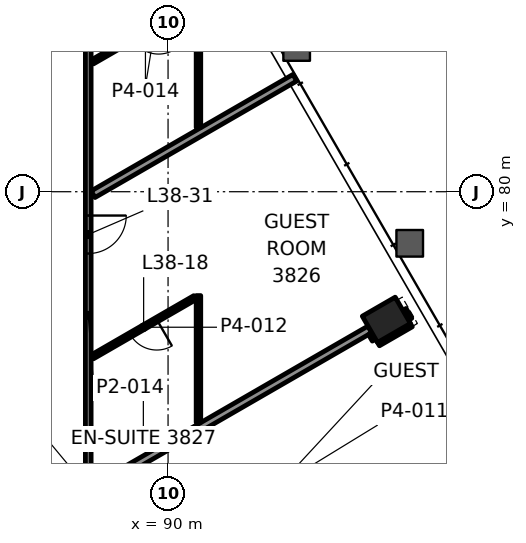
"""IFC4 building model, lengths in metres.
Left out: names, types, materials, properties, quantities, classifications, styles, units other than length and angle.
Written with IfcOpenShell. Run it as: python <this file> out.ifc"""

import sys

from ifc_helpers import new_model, si_unit, direction, frame, frame_2d, origin, origin_2d, place, context, subcontext, project, spatial, rectangle, hollow_rectangle, extrude, element, fill, save


model = new_model("IFC4")
c1 = context("Model", 3, precision=1e-05, world=origin(), true_north=direction((0.0, 1.0)))
c2 = subcontext(c1, "Body", "Model", "MODEL_VIEW")
j1 = project(units=[si_unit("LENGTHUNIT", "METRE"), si_unit("PLANEANGLEUNIT", "RADIAN")], contexts=[c1])
p1 = place(None, origin())
s1 = spatial("IfcSite", under=j1, at=p1, CompositionType="ELEMENT")
p2 = place(p1, origin())
s2 = spatial("IfcBuilding", under=s1, at=p2, CompositionType="ELEMENT")
p3 = place(p2, frame((0.0, 0.0, 167.5)))
s3 = spatial("IfcBuildingStorey", under=s2, at=p3, CompositionType="ELEMENT", Elevation=167.5)
p4 = place(p3, frame((95.744, 76.628, -0.0), z_axis=(0.0, 0.0, 1.0), x_axis=(-0.5, 0.866025403784, 0.0)))
e1 = element("IfcColumn", 1, at=p4, inside=s3, PredefinedType="COLUMN", context=c2, shape_type="SweptSolid", body=[
    extrude(hollow_rectangle(XDim=0.8, YDim=1.0, WallThickness=0.05, at=origin_2d()), origin(), (0.0, 0.0, 1.0), 3.9),
])
p5 = place(p3, frame((89.47, 67.832, 0.0), z_axis=(0.0, 0.0, 1.0), x_axis=(0.866016372647, 0.500015642063, 0.0)))
e2 = element("IfcWall", 2, at=p5, inside=s3, PredefinedType="PARTITIONING", context=c2, shape_type="SweptSolid", body=[
    extrude(rectangle(XDim=10.932, YDim=0.2, at=frame_2d((5.466, 0.0))), origin(), (0.0, 0.0, 1.0), 3.022),
])
p6 = place(p3, frame((95.512, 76.032, 0.0), z_axis=(0.0, 0.0, 1.0), x_axis=(0.86597798544, 0.50008212199, 0.0)))
e3 = element("IfcWall", 3, at=p6, inside=s3, PredefinedType="PARTITIONING", context=c2, shape_type="SweptSolid", body=[
    extrude(rectangle(XDim=0.999, YDim=0.2, at=frame_2d((0.5, 0.0))), origin(), (0.0, 0.0, 1.0), 3.022),
])
p7 = place(p3, frame((88.027, 72.173, 0.0), z_axis=(0.0, 0.0, 1.0), x_axis=(0.866035743139, 0.499982091285, 0.0)))
e4 = element("IfcWall", 4, at=p7, inside=s3, PredefinedType="PARTITIONING", context=c2, shape_type="SweptSolid", body=[
    extrude(rectangle(XDim=8.411, YDim=0.2, at=frame_2d((4.206, 0.0))), origin(), (0.0, 0.0, 1.0), 3.1),
])
p8 = place(p3, frame((90.705, 77.212, 0.0), z_axis=(0.0, 0.0, 1.0), x_axis=(-0.866009247561, -0.500027982357, 0.0)))
e5 = element("IfcWall", 5, at=p8, inside=s3, PredefinedType="PARTITIONING", context=c2, shape_type="SweptSolid", body=[
    extrude(rectangle(XDim=3.113, YDim=0.12, at=frame_2d((1.556, 0.0))), origin(), (0.0, 0.0, 1.0), 3.1),
])
p9 = place(p8, frame((1.156, 0.0, 0.0)))
e6 = element("IfcOpeningElement", 6, at=p9, cuts=e5, PredefinedType="OPENING", context=c2, shape_type="SweptSolid", body=[
    extrude(rectangle(XDim=0.8, YDim=2.1, at=frame_2d((0.4, 1.05))), frame((0.0, 0.07, 0.0), z_axis=(0.0, -1.0, 0.0), x_axis=(1.0, 0.0, 0.0)), (0.0, 0.0, 1.0), 0.14),
])
p10 = place(p3, frame((88.027, 79.934, 0.0), z_axis=(0.0, 0.0, 1.0), x_axis=(0.866029087811, 0.499993619025, 0.0)))
e7 = element("IfcWall", 7, at=p10, inside=s3, PredefinedType="PARTITIONING", context=c2, shape_type="SweptSolid", body=[
    extrude(rectangle(XDim=6.131, YDim=0.2, at=frame_2d((3.065, 0.0))), origin(), (0.0, 0.0, 1.0), 3.022),
])
p11 = place(p3, frame((90.8, 85.028, 0.0), z_axis=(0.0, 0.0, 1.0), x_axis=(-0.866010186656, -0.500026355914, 0.0)))
e8 = element("IfcWall", 8, at=p11, inside=s3, PredefinedType="PARTITIONING", context=c2, shape_type="SweptSolid", body=[
    extrude(rectangle(XDim=3.222, YDim=0.12, at=frame_2d((1.611, 0.0))), origin(), (0.0, 0.0, 1.0), 3.022),
])
p12 = place(p11, frame((1.211, 0.0, 0.0)))
e9 = element("IfcOpeningElement", 9, at=p12, cuts=e8, PredefinedType="OPENING", context=c2, shape_type="SweptSolid", body=[
    extrude(rectangle(XDim=0.8, YDim=2.1, at=frame_2d((0.4, 1.05))), frame((0.0, 0.07, 0.0), z_axis=(0.0, -1.0, 0.0), x_axis=(1.0, 0.0, 0.0)), (0.0, 0.0, 1.0), 0.14),
])
p13 = place(p3, frame((90.8, 73.929, 0.0), z_axis=(0.0, 0.0, 1.0), x_axis=(0.0, 1.0, 0.0)))
e10 = element("IfcWall", 10, at=p13, inside=s3, PredefinedType="PARTITIONING", context=c2, shape_type="SweptSolid", body=[
    extrude(rectangle(XDim=3.337, YDim=0.12, at=frame_2d((1.668, 0.0))), origin(), (0.0, 0.0, 1.0), 3.1),
])
p14 = place(p3, frame((90.8, 81.69, 0.0), z_axis=(0.0, 0.0, 1.0), x_axis=(0.0, 1.0, 0.0)))
e11 = element("IfcWall", 11, at=p14, inside=s3, PredefinedType="PARTITIONING", context=c2, shape_type="SweptSolid", body=[
    extrude(rectangle(XDim=2.502, YDim=0.12, at=frame_2d((1.251, 0.0))), origin(), (0.0, 0.0, 1.0), 3.1),
])
p15 = place(p3, frame((87.9, 84.899, 0.0), z_axis=(0.0, 0.0, 1.0), x_axis=(0.0, -1.0, 0.0)))
e12 = element("IfcWall", 12, at=p15, inside=s3, PredefinedType="PARTITIONING", context=c2, shape_type="SweptSolid", body=[
    extrude(rectangle(XDim=16.308, YDim=0.15, at=frame_2d((8.154, 0.0))), origin(), (0.0, 0.0, 1.0), 3.1),
])
p16 = place(p15, frame((5.527, 0.0, 0.0)))
e13 = element("IfcOpeningElement", 13, at=p16, cuts=e12, PredefinedType="OPENING", context=c2, shape_type="SweptSolid", body=[
    extrude(rectangle(XDim=1.0, YDim=2.1, at=frame_2d((0.5, 1.05))), frame((0.0, 0.085, 0.0), z_axis=(0.0, -1.0, 0.0), x_axis=(1.0, 0.0, 0.0)), (0.0, 0.0, 1.0), 0.17),
])
p17 = place(p15, frame((13.074, 0.0, 0.0)))
e14 = element("IfcOpeningElement", 14, at=p17, cuts=e12, PredefinedType="OPENING", context=c2, shape_type="SweptSolid", body=[
    extrude(rectangle(XDim=1.0, YDim=2.1, at=frame_2d((0.5, 1.05))), frame((0.0, 0.085, 0.0), z_axis=(0.0, -1.0, 0.0), x_axis=(1.0, 0.0, 0.0)), (0.0, 0.0, 1.0), 0.17),
])
p18 = place(p3, frame((96.327, 76.619, 0.0), z_axis=(0.0, 0.0, 1.0), x_axis=(-0.49965177357, 0.866226359082, 0.0)))
e15 = element("IfcWall", 15, at=p18, inside=s3, PredefinedType="PARTITIONING", context=c2, shape_type="SweptSolid", body=[
    extrude(rectangle(XDim=0.299, YDim=0.2, at=frame_2d((0.149, 0.0))), origin(), (0.0, 0.0, 1.0), 3.1),
])
p19 = place(p3, frame((95.461, 76.119, 0.0), z_axis=(0.0, 0.0, 1.0), x_axis=(-0.500359323436, 0.865817848887, 0.0)))
e16 = element("IfcWall", 16, at=p19, inside=s3, PredefinedType="PARTITIONING", context=c2, shape_type="SweptSolid", body=[
    extrude(rectangle(XDim=0.199, YDim=0.2, at=frame_2d((0.1, 0.0))), origin(), (0.0, 0.0, 1.0), 3.1),
])
p20 = place(p9, origin())
e17 = element("IfcDoor", 17, at=p20, inside=s3, OperationType="SINGLE_SWING_LEFT", PredefinedType="DOOR", context=c2, shape_type="SweptSolid", body=[
    extrude(rectangle(XDim=0.8, YDim=2.1, at=frame_2d((0.4, 1.05))), frame((0.0, 0.025, 0.0), z_axis=(0.0, -1.0, 0.0), x_axis=(1.0, 0.0, 0.0)), (0.0, 0.0, 1.0), 0.05),
])
fill(e6, e17)
p21 = place(p16, origin())
e18 = element("IfcDoor", 18, at=p21, inside=s3, OperationType="SINGLE_SWING_RIGHT", PredefinedType="DOOR", context=c2, shape_type="SweptSolid", body=[
    extrude(rectangle(XDim=1.0, YDim=2.1, at=frame_2d((0.5, 1.05))), frame((0.0, 0.025, 0.0), z_axis=(0.0, -1.0, 0.0), x_axis=(1.0, 0.0, 0.0)), (0.0, 0.0, 1.0), 0.05),
])
fill(e13, e18)
save(model, sys.argv[1])
